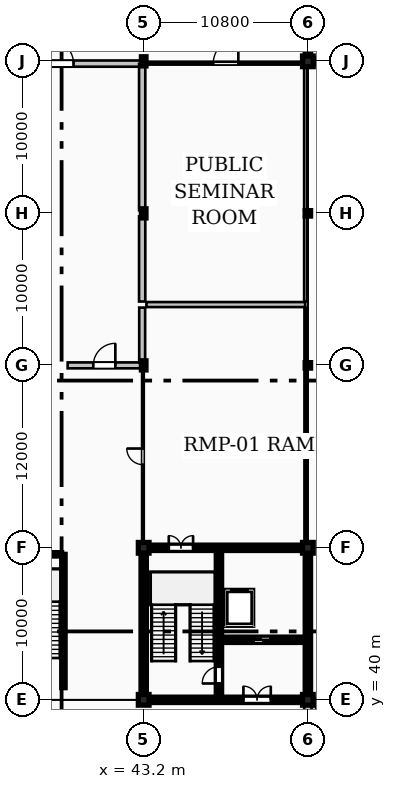
"""IFC4 building model, lengths in metres.
Left out: names, types, materials, properties, quantities, classifications, styles, units other than length and angle.
Written with IfcOpenShell. Run it as: python <this file> out.ifc"""

import sys

from ifc_helpers import new_model, si_unit, direction, frame, frame_2d, origin, origin_2d, place, context, subcontext, project, spatial, rectangle, hollow_circle, i_section, extrude, element, fill, save


model = new_model("IFC4")
c1 = context("Model", 3, precision=1e-05, world=origin(), true_north=direction((0.0, 1.0)))
c2 = subcontext(c1, "Body", "Model", "MODEL_VIEW")
j1 = project(units=[si_unit("LENGTHUNIT", "METRE"), si_unit("PLANEANGLEUNIT", "RADIAN")], contexts=[c1])
p1 = place(None, origin())
s1 = spatial("IfcSite", under=j1, at=p1, CompositionType="ELEMENT")
p2 = place(p1, origin())
s2 = spatial("IfcBuilding", under=s1, at=p2, CompositionType="ELEMENT")
p3 = place(p2, origin())
s3 = spatial("IfcBuildingStorey", under=s2, at=p3, CompositionType="ELEMENT", Elevation=0.0)
for number, where, z_axis, x_axis in (
    (1, (43.2, 40.0, 0.0), (0.0, 0.0, 1.0), (1.0, 0.0, 0.0)),
    (2, (43.2, 50.0, 0.0), (0.0, 0.0, 1.0), (1.0, 0.0, 0.0)),
):
    element("IfcColumn", number, at=place(p3, frame(where, z_axis=z_axis, x_axis=x_axis)), inside=s3, PredefinedType="COLUMN", context=c2, shape_type="SweptSolid", body=[
        extrude(rectangle(XDim=0.7, YDim=0.7, at=origin_2d()), origin(), (0.0, 0.0, 1.0), 4.8),
    ])
for number, where, z_axis, x_axis in (
    (3, (43.2, 62.0, 0.0), (0.0, 0.0, 1.0), (1.0, 0.0, 0.0)),
    (4, (43.2, 72.0, 0.0), (0.0, 0.0, 1.0), (1.0, 0.0, 0.0)),
    (5, (43.2, 82.0, 0.0), (0.0, 0.0, 1.0), (1.0, 0.0, 0.0)),
):
    element("IfcColumn", number, at=place(p3, frame(where, z_axis=z_axis, x_axis=x_axis)), inside=s3, PredefinedType="COLUMN", context=c2, shape_type="SweptSolid", body=[
        extrude(i_section(OverallWidth=0.3, OverallDepth=0.6, WebThickness=0.015, FlangeThickness=0.03, FilletRadius=0.027, at=origin_2d()), origin(), (0.0, 0.0, 1.0), 4.8),
    ])
for number, where, z_axis, x_axis in (
    (6, (54.0, 40.0, 0.0), (0.0, 0.0, 1.0), (1.0, 0.0, 0.0)),
    (7, (54.0, 50.0, 0.0), (0.0, 0.0, 1.0), (1.0, 0.0, 0.0)),
):
    element("IfcColumn", number, at=place(p3, frame(where, z_axis=z_axis, x_axis=x_axis)), inside=s3, PredefinedType="COLUMN", context=c2, shape_type="SweptSolid", body=[
        extrude(rectangle(XDim=0.7, YDim=0.7, at=origin_2d()), origin(), (0.0, 0.0, 1.0), 4.8),
    ])
for number, where, z_axis, x_axis in (
    (8, (54.0, 62.0, 0.0), (0.0, 0.0, 1.0), (1.0, 0.0, 0.0)),
    (9, (54.0, 72.0, 0.0), (0.0, 0.0, 1.0), (1.0, 0.0, 0.0)),
):
    element("IfcColumn", number, at=place(p3, frame(where, z_axis=z_axis, x_axis=x_axis)), inside=s3, PredefinedType="COLUMN", context=c2, shape_type="SweptSolid", body=[
        extrude(hollow_circle(Radius=0.178, WallThickness=0.016, at=origin_2d()), origin(), (0.0, 0.0, 1.0), 4.8),
    ])
p4 = place(p3, frame((54.0, 82.0, 0.0), z_axis=(0.0, 0.0, 1.0), x_axis=(1.0, 0.0, 0.0)))
e10 = element("IfcColumn", 10, at=p4, inside=s3, PredefinedType="COLUMN", context=c2, shape_type="SweptSolid", body=[
    extrude(rectangle(XDim=0.7, YDim=0.7, at=origin_2d()), origin(), (0.0, 0.0, 1.0), 4.8),
])
p5 = place(p3, frame((54.0, 30.145, 0.0), z_axis=(0.0, 0.0, 1.0), x_axis=(0.0, 1.0, 0.0)))
e11 = element("IfcWall", 11, at=p5, inside=s3, PredefinedType="STANDARD", context=c2, shape_type="SweptSolid", body=[
    extrude(rectangle(XDim=9.71, YDim=0.48, at=frame_2d((4.855, 0.0))), origin(), (0.0, 0.0, 1.0), 4.56),
])
p6 = place(p5, frame((2.755, 0.0, 0.9)))
e12 = element("IfcOpeningElement", 12, at=p6, cuts=e11, PredefinedType="OPENING", context=c2, shape_type="SweptSolid", body=[
    extrude(rectangle(XDim=4.2, YDim=2.7, at=frame_2d((2.1, 1.35))), frame((0.0, 0.25, 0.0), z_axis=(0.0, -1.0, 0.0), x_axis=(1.0, 0.0, 0.0)), (0.0, 0.0, 1.0), 0.5),
])
p7 = place(p3, frame((54.145, 40.0, 0.0), z_axis=(0.0, 0.0, 1.0), x_axis=(1.0, 0.0, 0.0)))
e13 = element("IfcWall", 13, at=p7, inside=s3, PredefinedType="STANDARD", context=c2, shape_type="SweptSolid", body=[
    extrude(rectangle(XDim=0.225, YDim=0.3, at=frame_2d((0.113, 0.0))), origin(), (0.0, 0.0, 1.0), 4.56),
])
p8 = place(p3, frame((54.35, 82.0, 0.0), z_axis=(0.0, 0.0, 1.0), x_axis=(1.0, 0.0, 0.0)))
e14 = element("IfcWall", 14, at=p8, inside=s3, PredefinedType="SHEAR", context=c2, shape_type="SweptSolid", body=[
    extrude(rectangle(XDim=10.1, YDim=0.35, at=frame_2d((5.05, 0.0))), origin(), (0.0, 0.0, 1.0), 4.56),
])
p9 = place(p3, frame((54.0, 82.35, 0.0), z_axis=(0.0, 0.0, 1.0), x_axis=(0.0, 1.0, 0.0)))
e15 = element("IfcWall", 15, at=p9, inside=s3, PredefinedType="SHEAR", context=c2, shape_type="SweptSolid", body=[
    extrude(rectangle(XDim=9.3, YDim=0.35, at=frame_2d((4.65, 0.0))), origin(), (0.0, 0.0, 1.0), 4.56),
])
p10 = place(p9, frame((1.1, 0.0, 0.0)))
e16 = element("IfcOpeningElement", 16, at=p10, cuts=e15, PredefinedType="OPENING", context=c2, shape_type="SweptSolid", body=[
    extrude(rectangle(XDim=1.1, YDim=2.2, at=frame_2d((0.55, 1.1))), frame((0.0, 0.185, 0.0), z_axis=(0.0, -1.0, 0.0), x_axis=(1.0, 0.0, 0.0)), (0.0, 0.0, 1.0), 0.37),
])
p11 = place(p3, frame((43.55, 40.0, 0.0), z_axis=(0.0, 0.0, 1.0), x_axis=(1.0, 0.0, 0.0)))
e17 = element("IfcWall", 17, at=p11, inside=s3, PredefinedType="SHEAR", context=c2, shape_type="SweptSolid", body=[
    extrude(rectangle(XDim=10.1, YDim=0.35, at=frame_2d((5.05, 0.0))), origin(), (0.0, 0.0, 1.0), 4.56),
])
p12 = place(p11, frame((6.21, 0.0, 0.0)))
e18 = element("IfcOpeningElement", 18, at=p12, cuts=e17, PredefinedType="OPENING", context=c2, shape_type="SweptSolid", body=[
    extrude(rectangle(XDim=1.8, YDim=2.25, at=frame_2d((0.9, 1.125))), frame((0.0, 0.185, 0.0), z_axis=(0.0, -1.0, 0.0), x_axis=(1.0, 0.0, 0.0)), (0.0, 0.0, 1.0), 0.37),
])
p13 = place(p3, frame((43.55, 50.0, 0.0), z_axis=(0.0, 0.0, 1.0), x_axis=(1.0, 0.0, 0.0)))
e19 = element("IfcWall", 19, at=p13, inside=s3, PredefinedType="SHEAR", context=c2, shape_type="SweptSolid", body=[
    extrude(rectangle(XDim=10.1, YDim=0.35, at=frame_2d((5.05, 0.0))), origin(), (0.0, 0.0, 1.0), 4.56),
])
p14 = place(p13, frame((1.3, 0.0, 0.0)))
e20 = element("IfcOpeningElement", 20, at=p14, cuts=e19, PredefinedType="OPENING", context=c2, shape_type="SweptSolid", body=[
    extrude(rectangle(XDim=1.6, YDim=2.2, at=frame_2d((0.8, 1.1))), frame((0.0, 0.185, 0.0), z_axis=(0.0, -1.0, 0.0), x_axis=(1.0, 0.0, 0.0)), (0.0, 0.0, 1.0), 0.37),
])
for number, where, z_axis, x_axis in (
    (21, (43.2, 40.35, 0.0), (0.0, 0.0, 1.0), (0.0, 1.0, 0.0)),
    (22, (54.0, 40.35, 0.0), (0.0, 0.0, 1.0), (0.0, 1.0, 0.0)),
):
    element("IfcWall", number, at=place(p3, frame(where, z_axis=z_axis, x_axis=x_axis)), inside=s3, PredefinedType="SHEAR", context=c2, shape_type="SweptSolid", body=[
        extrude(rectangle(XDim=9.3, YDim=0.35, at=frame_2d((4.65, 0.0))), origin(), (0.0, 0.0, 1.0), 4.56),
    ])
p15 = place(p3, frame((48.15, 40.175, 0.0), z_axis=(0.0, 0.0, 1.0), x_axis=(0.0, 1.0, 0.0)))
e23 = element("IfcWall", 23, at=p15, inside=s3, PredefinedType="SHEAR", context=c2, shape_type="SweptSolid", body=[
    extrude(rectangle(XDim=9.65, YDim=0.35, at=frame_2d((4.825, 0.0))), origin(), (0.0, 0.0, 1.0), 4.56),
])
p16 = place(p15, frame((0.9, 0.0, 0.0)))
e24 = element("IfcOpeningElement", 24, at=p16, cuts=e23, PredefinedType="OPENING", context=c2, shape_type="SweptSolid", body=[
    extrude(rectangle(XDim=1.1, YDim=2.2, at=frame_2d((0.55, 1.1))), frame((0.0, 0.185, 0.0), z_axis=(0.0, -1.0, 0.0), x_axis=(1.0, 0.0, 0.0)), (0.0, 0.0, 1.0), 0.37),
])
p17 = place(p3, frame((48.33, 43.95, 0.0), z_axis=(0.0, 0.0, 1.0), x_axis=(1.0, 0.0, 0.0)))
e25 = element("IfcWall", 25, at=p17, inside=s3, PredefinedType="SHEAR", context=c2, shape_type="SweptSolid", body=[
    extrude(rectangle(XDim=5.49, YDim=0.35, at=frame_2d((2.745, 0.0))), origin(), (0.0, 0.0, 1.0), 4.56),
])
p18 = place(p17, frame((2.1, 0.0, 0.0)))
e26 = element("IfcOpeningElement", 26, at=p18, cuts=e25, PredefinedType="OPENING", context=c2, shape_type="SweptSolid", body=[
    extrude(rectangle(XDim=1.1, YDim=2.2, at=frame_2d((0.55, 1.1))), frame((0.0, 0.185, 0.0), z_axis=(0.0, -1.0, 0.0), x_axis=(1.0, 0.0, 0.0)), (0.0, 0.0, 1.0), 0.37),
])
p19 = place(p3, frame((37.92, 40.8, 0.0), z_axis=(0.0, 0.0, 1.0), x_axis=(0.0, 1.0, 0.0)))
e27 = element("IfcWall", 27, at=p19, inside=s3, PredefinedType="SHEAR", context=c2, shape_type="SweptSolid", body=[
    extrude(rectangle(XDim=8.77, YDim=0.22, at=frame_2d((4.385, 0.0))), origin(), (0.0, 0.0, 1.0), 4.56),
])
p20 = place(p3, frame((33.4, 49.57, 0.0), z_axis=(0.0, 0.0, 1.0), x_axis=(1.0, 0.0, 0.0)))
e28 = element("IfcWall", 28, at=p20, inside=s3, PredefinedType="SHEAR", context=c2, shape_type="SweptSolid", body=[
    extrude(rectangle(XDim=4.4, YDim=0.22, at=frame_2d((2.2, 0.0))), origin(), (0.0, 0.0, 1.0), 4.56),
])
p21 = place(p3, frame((38.2, 62.0, 0.0), z_axis=(0.0, 0.0, 1.0), x_axis=(1.0, 0.0, 0.0)))
e29 = element("IfcWall", 29, at=p21, inside=s3, PredefinedType="PARTITIONING", context=c2, shape_type="SweptSolid", body=[
    extrude(rectangle(XDim=4.82, YDim=0.39, at=frame_2d((2.41, 0.0))), origin(), (0.0, 0.0, 1.0), 4.049),
])
p22 = place(p21, frame((1.685, 0.0, 0.0)))
e30 = element("IfcOpeningElement", 30, at=p22, cuts=e29, PredefinedType="OPENING", context=c2, shape_type="SweptSolid", body=[
    extrude(rectangle(XDim=1.45, YDim=2.35, at=frame_2d((0.725, 1.175))), frame((0.0, 0.205, 0.0), z_axis=(0.0, -1.0, 0.0), x_axis=(1.0, 0.0, 0.0)), (0.0, 0.0, 1.0), 0.41),
])
p23 = place(p3, frame((32.6, 81.85, 0.0), z_axis=(0.0, 0.0, 1.0), x_axis=(1.0, 0.0, 0.0)))
e31 = element("IfcWall", 31, at=p23, inside=s3, PredefinedType="PARTITIONING", context=c2, shape_type="SweptSolid", body=[
    extrude(rectangle(XDim=10.42, YDim=0.41, at=frame_2d((5.21, 0.0))), origin(), (0.0, 0.0, 1.0), 3.989),
])
p24 = place(p23, frame((4.435, 0.0, 0.0)))
e32 = element("IfcOpeningElement", 32, at=p24, cuts=e31, PredefinedType="OPENING", context=c2, shape_type="SweptSolid", body=[
    extrude(rectangle(XDim=1.55, YDim=2.4, at=frame_2d((0.775, 1.2))), frame((0.0, 0.215, 0.0), z_axis=(0.0, -1.0, 0.0), x_axis=(1.0, 0.0, 0.0)), (0.0, 0.0, 1.0), 0.43),
])
p25 = place(p3, frame((43.38, 81.85, 0.0), z_axis=(0.0, 0.0, 1.0), x_axis=(1.0, 0.0, 0.0)))
e33 = element("IfcWall", 33, at=p25, inside=s3, PredefinedType="PARTITIONING", context=c2, shape_type="SweptSolid", body=[
    extrude(rectangle(XDim=10.44, YDim=0.13, at=frame_2d((5.22, 0.0))), origin(), (0.0, 0.0, 1.0), 3.989),
])
p26 = place(p25, frame((4.395, 0.0, 0.0)))
e34 = element("IfcOpeningElement", 34, at=p26, cuts=e33, PredefinedType="OPENING", context=c2, shape_type="SweptSolid", body=[
    extrude(rectangle(XDim=1.65, YDim=2.4, at=frame_2d((0.825, 1.2))), frame((0.0, 0.075, 0.0), z_axis=(0.0, -1.0, 0.0), x_axis=(1.0, 0.0, 0.0)), (0.0, 0.0, 1.0), 0.15),
])
p27 = place(p3, frame((43.15, 50.18, 0.0), z_axis=(0.0, 0.0, 1.0), x_axis=(0.0, 1.0, 0.0)))
e35 = element("IfcWall", 35, at=p27, inside=s3, PredefinedType="PARTITIONING", context=c2, shape_type="SweptSolid", body=[
    extrude(rectangle(XDim=11.64, YDim=0.11, at=frame_2d((5.82, 0.0))), origin(), (0.0, 0.0, 1.0), 3.939),
])
p28 = place(p27, frame((5.29, 0.0, 0.0)))
e36 = element("IfcOpeningElement", 36, at=p28, cuts=e35, PredefinedType="OPENING", context=c2, shape_type="SweptSolid", body=[
    extrude(rectangle(XDim=1.06, YDim=2.22, at=frame_2d((0.53, 1.11))), frame((0.0, 0.065, 0.0), z_axis=(0.0, -1.0, 0.0), x_axis=(1.0, 0.0, 0.0)), (0.0, 0.0, 1.0), 0.13),
])
p29 = place(p3, frame((43.38, 66.0, 0.0), z_axis=(0.0, 0.0, 1.0), x_axis=(1.0, 0.0, 0.0)))
e37 = element("IfcWall", 37, at=p29, inside=s3, PredefinedType="PARTITIONING", context=c2, shape_type="SweptSolid", body=[
    extrude(rectangle(XDim=10.44, YDim=0.33, at=frame_2d((5.22, 0.0))), origin(), (0.0, 0.0, 1.0), 4.52),
])
p30 = place(p3, frame((43.1, 62.18, 0.0), z_axis=(0.0, 0.0, 1.0), x_axis=(0.0, 1.0, 0.0)))
e38 = element("IfcWall", 38, at=p30, inside=s3, PredefinedType="PARTITIONING", context=c2, shape_type="SweptSolid", body=[
    extrude(rectangle(XDim=3.62, YDim=0.39, at=frame_2d((1.81, 0.0))), origin(), (0.0, 0.0, 1.0), 4.04),
])
p31 = place(p3, frame((43.1, 66.2, 0.0), z_axis=(0.0, 0.0, 1.0), x_axis=(0.0, 1.0, 0.0)))
e39 = element("IfcWall", 39, at=p31, inside=s3, PredefinedType="PARTITIONING", context=c2, shape_type="SweptSolid", body=[
    extrude(rectangle(XDim=5.6, YDim=0.41, at=frame_2d((2.8, 0.0))), origin(), (0.0, 0.0, 1.0), 4.52),
])
p32 = place(p3, frame((43.1, 72.2, 0.0), z_axis=(0.0, 0.0, 1.0), x_axis=(0.0, 1.0, 0.0)))
e40 = element("IfcWall", 40, at=p32, inside=s3, PredefinedType="PARTITIONING", context=c2, shape_type="SweptSolid", body=[
    extrude(rectangle(XDim=9.62, YDim=0.41, at=frame_2d((4.81, 0.0))), origin(), (0.0, 0.0, 1.0), 4.52),
])
p33 = place(p3, frame((53.86, 50.18, 0.0), z_axis=(0.0, 0.0, 1.0), x_axis=(0.0, 1.0, 0.0)))
e41 = element("IfcWall", 41, at=p33, inside=s3, PredefinedType="PARTITIONING", context=c2, shape_type="SweptSolid", body=[
    extrude(rectangle(XDim=11.62, YDim=0.17, at=frame_2d((5.81, 0.0))), origin(), (0.0, 0.0, 1.0), 4.52),
])
p34 = place(p3, frame((53.86, 62.2, 0.0), z_axis=(0.0, 0.0, 1.0), x_axis=(0.0, 1.0, 0.0)))
e42 = element("IfcWall", 42, at=p34, inside=s3, PredefinedType="PARTITIONING", context=c2, shape_type="SweptSolid", body=[
    extrude(rectangle(XDim=3.6, YDim=0.17, at=frame_2d((1.8, 0.0))), origin(), (0.0, 0.0, 1.0), 4.52),
])
p35 = place(p3, frame((53.86, 66.2, 0.0), z_axis=(0.0, 0.0, 1.0), x_axis=(0.0, 1.0, 0.0)))
e43 = element("IfcWall", 43, at=p35, inside=s3, PredefinedType="PARTITIONING", context=c2, shape_type="SweptSolid", body=[
    extrude(rectangle(XDim=5.6, YDim=0.21, at=frame_2d((2.8, 0.0))), origin(), (0.0, 0.0, 1.0), 4.52),
])
p36 = place(p3, frame((53.86, 72.2, 0.0), z_axis=(0.0, 0.0, 1.0), x_axis=(0.0, 1.0, 0.0)))
e44 = element("IfcWall", 44, at=p36, inside=s3, PredefinedType="PARTITIONING", context=c2, shape_type="SweptSolid", body=[
    extrude(rectangle(XDim=9.62, YDim=0.21, at=frame_2d((4.81, 0.0))), origin(), (0.0, 0.0, 1.0), 4.52),
])
p37 = place(p16, origin())
e45 = element("IfcDoor", 45, at=p37, inside=s3, OperationType="SINGLE_SWING_LEFT", PredefinedType="DOOR", context=c2, shape_type="SweptSolid", body=[
    extrude(rectangle(XDim=1.1, YDim=2.2, at=frame_2d((0.55, 1.1))), frame((0.0, 0.025, 0.0), z_axis=(0.0, -1.0, 0.0), x_axis=(1.0, 0.0, 0.0)), (0.0, 0.0, 1.0), 0.05),
])
fill(e24, e45)
p38 = place(p12, origin())
e46 = element("IfcDoor", 46, at=p38, inside=s3, OperationType="DOUBLE_DOOR_SINGLE_SWING", PredefinedType="DOOR", context=c2, shape_type="SweptSolid", body=[
    extrude(rectangle(XDim=1.8, YDim=2.25, at=frame_2d((0.9, 1.125))), frame((0.0, 0.025, 0.0), z_axis=(0.0, -1.0, 0.0), x_axis=(1.0, 0.0, 0.0)), (0.0, 0.0, 1.0), 0.05),
])
fill(e18, e46)
p39 = place(p14, origin())
e47 = element("IfcDoor", 47, at=p39, inside=s3, OperationType="DOUBLE_DOOR_SINGLE_SWING", PredefinedType="DOOR", context=c2, shape_type="SweptSolid", body=[
    extrude(rectangle(XDim=1.6, YDim=2.2, at=frame_2d((0.8, 1.1))), frame((0.0, 0.025, 0.0), z_axis=(0.0, -1.0, 0.0), x_axis=(1.0, 0.0, 0.0)), (0.0, 0.0, 1.0), 0.05),
])
fill(e20, e47)
p40 = place(p18, origin())
e48 = element("IfcDoor", 48, at=p40, inside=s3, OperationType="DOUBLE_DOOR_SLIDING", PredefinedType="DOOR", context=c2, shape_type="SweptSolid", body=[
    extrude(rectangle(XDim=1.1, YDim=2.2, at=frame_2d((0.55, 1.1))), frame((0.0, 0.025, 0.0), z_axis=(0.0, -1.0, 0.0), x_axis=(1.0, 0.0, 0.0)), (0.0, 0.0, 1.0), 0.05),
])
fill(e26, e48)
p41 = place(p22, origin())
e49 = element("IfcDoor", 49, at=p41, inside=s3, OperationType="SINGLE_SWING_RIGHT", PredefinedType="DOOR", context=c2, shape_type="SweptSolid", body=[
    extrude(rectangle(XDim=1.45, YDim=2.35, at=frame_2d((0.725, 1.175))), frame((0.0, 0.025, 0.0), z_axis=(0.0, -1.0, 0.0), x_axis=(1.0, 0.0, 0.0)), (0.0, 0.0, 1.0), 0.05),
])
fill(e30, e49)
p42 = place(p24, origin())
e50 = element("IfcDoor", 50, at=p42, inside=s3, OperationType="SINGLE_SWING_LEFT", PredefinedType="DOOR", context=c2, shape_type="SweptSolid", body=[
    extrude(rectangle(XDim=1.55, YDim=2.4, at=frame_2d((0.775, 1.2))), frame((0.0, 0.025, 0.0), z_axis=(0.0, -1.0, 0.0), x_axis=(1.0, 0.0, 0.0)), (0.0, 0.0, 1.0), 0.05),
])
fill(e32, e50)
p43 = place(p26, origin())
e51 = element("IfcDoor", 51, at=p43, inside=s3, OperationType="SINGLE_SWING_RIGHT", PredefinedType="DOOR", context=c2, shape_type="SweptSolid", body=[
    extrude(rectangle(XDim=1.65, YDim=2.4, at=frame_2d((0.825, 1.2))), frame((0.0, 0.025, 0.0), z_axis=(0.0, -1.0, 0.0), x_axis=(1.0, 0.0, 0.0)), (0.0, 0.0, 1.0), 0.05),
])
fill(e34, e51)
p44 = place(p28, origin())
e52 = element("IfcDoor", 52, at=p44, inside=s3, OperationType="SINGLE_SWING_RIGHT", PredefinedType="DOOR", context=c2, shape_type="SweptSolid", body=[
    extrude(rectangle(XDim=1.06, YDim=2.22, at=frame_2d((0.53, 1.11))), frame((0.0, 0.025, 0.0), z_axis=(0.0, -1.0, 0.0), x_axis=(1.0, 0.0, 0.0)), (0.0, 0.0, 1.0), 0.05),
])
fill(e36, e52)
save(model, sys.argv[1])
